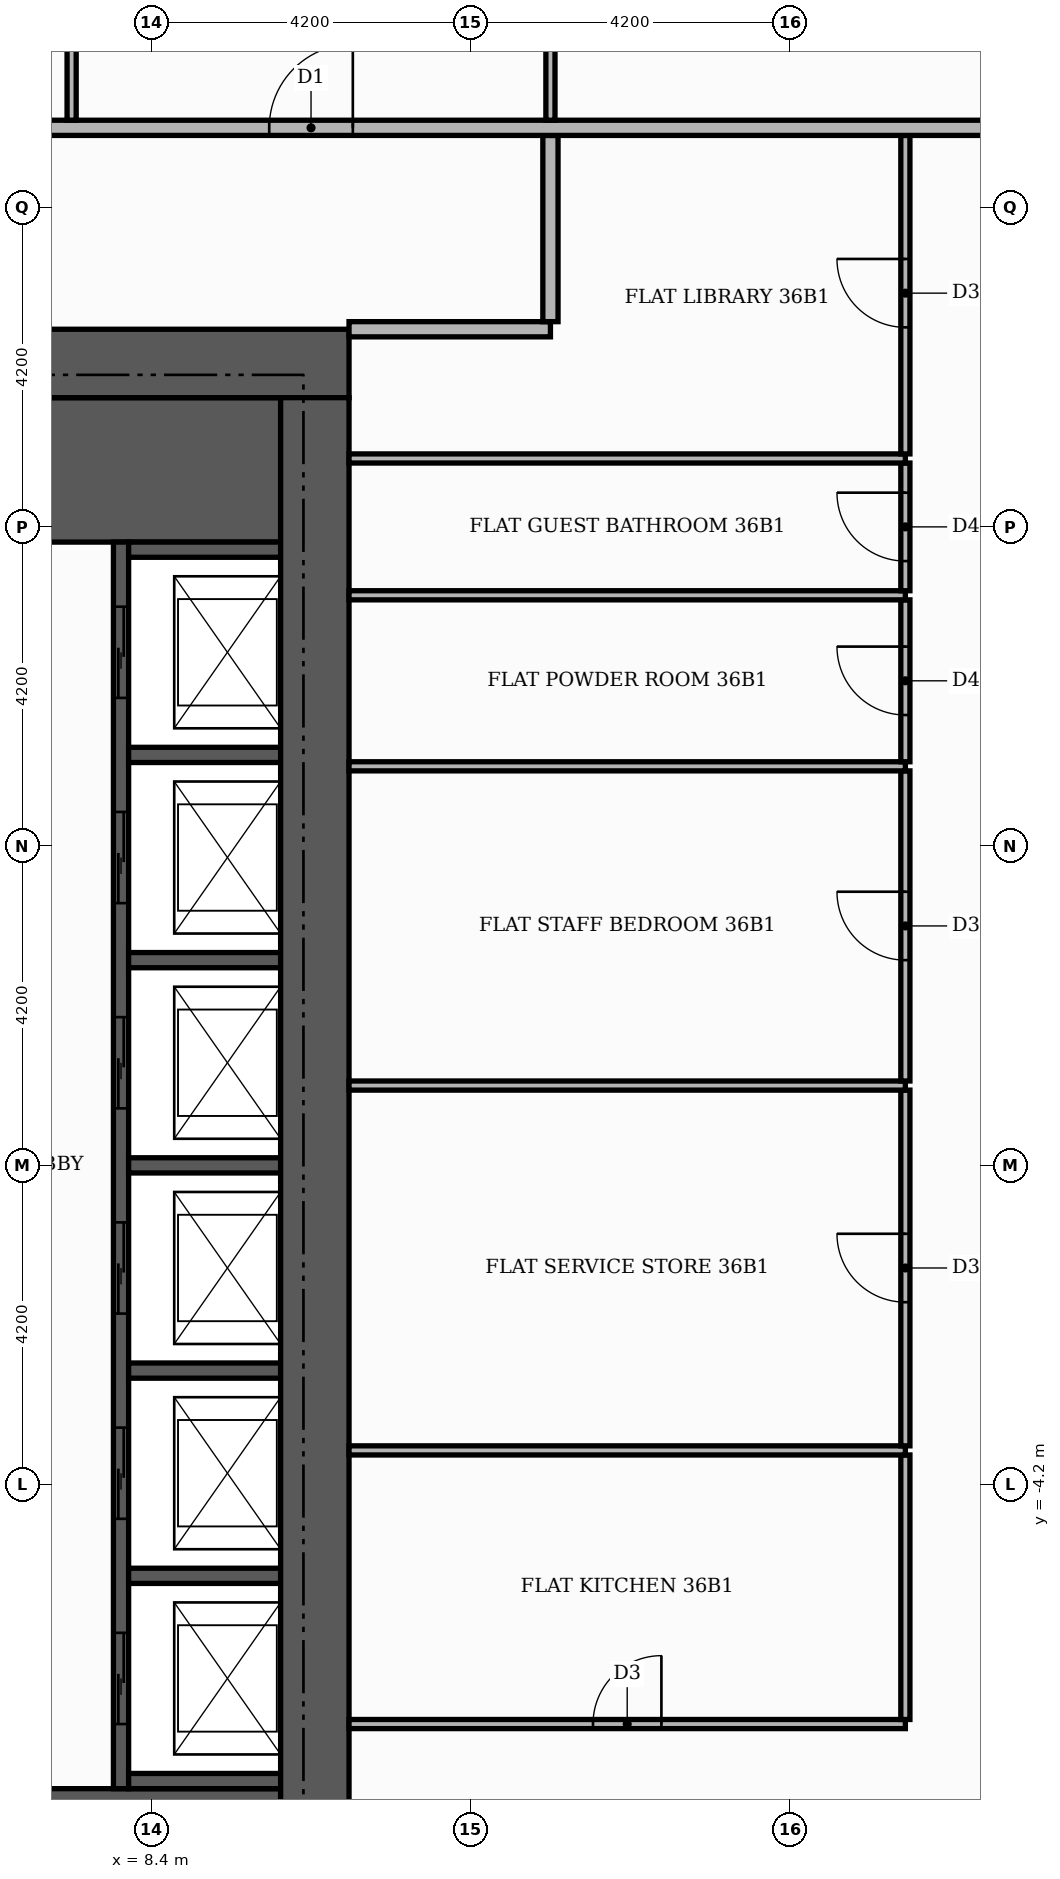
"""IFC4 building model, lengths in metres.
Left out: names, types, materials, properties, quantities, classifications, styles, units other than length and angle.
Written with IfcOpenShell. Run it as: python <this file> out.ifc"""

import sys

from ifc_helpers import new_model, si_unit, direction, frame, frame_2d, origin, place, context, subcontext, project, spatial, rectangle, extrude, element, fill, save


model = new_model("IFC4")
c1 = context("Model", 3, precision=1e-05, world=origin(), true_north=direction((0.0, 1.0)))
c2 = subcontext(c1, "Body", "Model", "MODEL_VIEW")
j1 = project(units=[si_unit("LENGTHUNIT", "METRE"), si_unit("PLANEANGLEUNIT", "RADIAN")], contexts=[c1])
p1 = place(None, origin())
s1 = spatial("IfcSite", under=j1, at=p1, CompositionType="ELEMENT")
p2 = place(p1, origin())
s2 = spatial("IfcBuilding", under=s1, at=p2, CompositionType="ELEMENT")
p3 = place(p2, frame((0.0, 0.0, 153.3)))
s3 = spatial("IfcBuildingStorey", under=s2, at=p3, CompositionType="ELEMENT", Elevation=153.3)
for number, where, z_axis, x_axis in (
    (1, (5.5, -9.15, 0.0), (0.0, 0.0, 1.0), (1.0, 0.0, 0.0)),
    (2, (5.5, 9.15, 0.0), (0.0, 0.0, 1.0), (1.0, 0.0, 0.0)),
):
    element("IfcWall", number, at=place(p3, frame(where, z_axis=z_axis, x_axis=x_axis)), inside=s3, PredefinedType="SHEAR", context=c2, shape_type="SweptSolid", body=[
        extrude(rectangle(XDim=4.6, YDim=1.9, at=frame_2d((2.3, 0.0))), origin(), (0.0, 0.0, 1.0), 3.48),
    ])
p4 = place(p3, frame((8.0, -8.2, 0.0), z_axis=(0.0, 0.0, 1.0), x_axis=(0.0, 1.0, 0.0)))
e3 = element("IfcWall", 3, at=p4, inside=s3, PredefinedType="SHEAR", context=c2, shape_type="SweptSolid", body=[
    extrude(rectangle(XDim=16.4, YDim=0.2, at=frame_2d((8.2, 0.0))), origin(), (0.0, 0.0, 1.0), 3.48),
])
p5 = place(p4, frame((0.85, 0.0, 0.0)))
e4 = element("IfcOpeningElement", 4, at=p5, cuts=e3, PredefinedType="OPENING", context=c2, shape_type="SweptSolid", body=[
    extrude(rectangle(XDim=1.2, YDim=2.1, at=frame_2d((0.6, 1.05))), frame((0.0, 0.11, 0.0), z_axis=(0.0, -1.0, 0.0), x_axis=(1.0, 0.0, 0.0)), (0.0, 0.0, 1.0), 0.22),
])
p6 = place(p4, frame((3.55, 0.0, 0.0)))
e5 = element("IfcOpeningElement", 5, at=p6, cuts=e3, PredefinedType="OPENING", context=c2, shape_type="SweptSolid", body=[
    extrude(rectangle(XDim=1.2, YDim=2.1, at=frame_2d((0.6, 1.05))), frame((0.0, 0.11, 0.0), z_axis=(0.0, -1.0, 0.0), x_axis=(1.0, 0.0, 0.0)), (0.0, 0.0, 1.0), 0.22),
])
p7 = place(p4, frame((6.25, 0.0, 0.0)))
e6 = element("IfcOpeningElement", 6, at=p7, cuts=e3, PredefinedType="OPENING", context=c2, shape_type="SweptSolid", body=[
    extrude(rectangle(XDim=1.2, YDim=2.1, at=frame_2d((0.6, 1.05))), frame((0.0, 0.11, 0.0), z_axis=(0.0, -1.0, 0.0), x_axis=(1.0, 0.0, 0.0)), (0.0, 0.0, 1.0), 0.22),
])
p8 = place(p4, frame((8.95, 0.0, 0.0)))
e7 = element("IfcOpeningElement", 7, at=p8, cuts=e3, PredefinedType="OPENING", context=c2, shape_type="SweptSolid", body=[
    extrude(rectangle(XDim=1.2, YDim=2.1, at=frame_2d((0.6, 1.05))), frame((0.0, 0.11, 0.0), z_axis=(0.0, -1.0, 0.0), x_axis=(1.0, 0.0, 0.0)), (0.0, 0.0, 1.0), 0.22),
])
p9 = place(p4, frame((11.65, 0.0, 0.0)))
e8 = element("IfcOpeningElement", 8, at=p9, cuts=e3, PredefinedType="OPENING", context=c2, shape_type="SweptSolid", body=[
    extrude(rectangle(XDim=1.2, YDim=2.1, at=frame_2d((0.6, 1.05))), frame((0.0, 0.11, 0.0), z_axis=(0.0, -1.0, 0.0), x_axis=(1.0, 0.0, 0.0)), (0.0, 0.0, 1.0), 0.22),
])
p10 = place(p4, frame((14.35, 0.0, 0.0)))
e9 = element("IfcOpeningElement", 9, at=p10, cuts=e3, PredefinedType="OPENING", context=c2, shape_type="SweptSolid", body=[
    extrude(rectangle(XDim=1.2, YDim=2.1, at=frame_2d((0.6, 1.05))), frame((0.0, 0.11, 0.0), z_axis=(0.0, -1.0, 0.0), x_axis=(1.0, 0.0, 0.0)), (0.0, 0.0, 1.0), 0.22),
])
for number, where, z_axis, x_axis in (
    (10, (8.1, -8.1, 0.0), (0.0, 0.0, 1.0), (1.0, 0.0, 0.0)),
    (11, (8.1, -5.4, 0.0), (0.0, 0.0, 1.0), (1.0, 0.0, 0.0)),
    (12, (8.1, -2.7, 0.0), (0.0, 0.0, 1.0), (1.0, 0.0, 0.0)),
    (13, (8.1, 0.0, 0.0), (0.0, 0.0, 1.0), (1.0, 0.0, 0.0)),
    (14, (8.1, 2.7, 0.0), (0.0, 0.0, 1.0), (1.0, 0.0, 0.0)),
    (15, (8.1, 5.4, 0.0), (0.0, 0.0, 1.0), (1.0, 0.0, 0.0)),
    (16, (8.1, 8.1, 0.0), (0.0, 0.0, 1.0), (1.0, 0.0, 0.0)),
):
    element("IfcWall", number, at=place(p3, frame(where, z_axis=z_axis, x_axis=x_axis)), inside=s3, PredefinedType="SHEAR", context=c2, shape_type="SweptSolid", body=[
        extrude(rectangle(XDim=2.0, YDim=0.2, at=frame_2d((1.0, 0.0))), origin(), (0.0, 0.0, 1.0), 3.48),
    ])
p11 = place(p3, frame((-11.0, 10.55, 0.0), z_axis=(0.0, 0.0, 1.0), x_axis=(1.0, 0.0, 0.0)))
e17 = element("IfcWall", 17, at=p11, inside=s3, PredefinedType="SHEAR", context=c2, shape_type="SweptSolid", body=[
    extrude(rectangle(XDim=22.0, YDim=0.9, at=frame_2d((11.0, 0.0))), origin(), (0.0, 0.0, 1.0), 3.48),
])
p12 = place(p11, frame((13.3, 0.0, 0.0)))
e18 = element("IfcOpeningElement", 18, at=p12, cuts=e17, PredefinedType="OPENING", context=c2, shape_type="SweptSolid", body=[
    extrude(rectangle(XDim=1.8, YDim=2.2, at=frame_2d((0.9, 1.1))), frame((0.0, 0.46, 0.0), z_axis=(0.0, -1.0, 0.0), x_axis=(1.0, 0.0, 0.0)), (0.0, 0.0, 1.0), 0.92),
])
p13 = place(p3, frame((10.55, -10.1, 0.0), z_axis=(0.0, 0.0, 1.0), x_axis=(0.0, 1.0, 0.0)))
e19 = element("IfcWall", 19, at=p13, inside=s3, PredefinedType="SHEAR", context=c2, shape_type="SweptSolid", body=[
    extrude(rectangle(XDim=20.2, YDim=0.9, at=frame_2d((10.1, 0.0))), origin(), (0.0, 0.0, 1.0), 3.48),
])
p14 = place(p3, frame((11.0, -7.35, 0.0), z_axis=(0.0, 0.0, 1.0), x_axis=(1.0, 0.0, 0.0)))
e20 = element("IfcWall", 20, at=p14, inside=s3, PredefinedType="PARTITIONING", context=c2, shape_type="SweptSolid", body=[
    extrude(rectangle(XDim=7.32, YDim=0.12, at=frame_2d((3.66, 0.0))), origin(), (0.0, 0.0, 1.0), 3.48),
])
p15 = place(p14, frame((3.21, 0.0, 0.0)))
e21 = element("IfcOpeningElement", 21, at=p15, cuts=e20, PredefinedType="OPENING", context=c2, shape_type="SweptSolid", body=[
    extrude(rectangle(XDim=0.9, YDim=2.1, at=frame_2d((0.45, 1.05))), frame((0.0, 0.07, 0.0), z_axis=(0.0, -1.0, 0.0), x_axis=(1.0, 0.0, 0.0)), (0.0, 0.0, 1.0), 0.14),
])
p16 = place(p3, frame((18.32, -7.29, 0.0), z_axis=(0.0, 0.0, 1.0), x_axis=(0.0, 1.0, 0.0)))
e22 = element("IfcWall", 22, at=p16, inside=s3, PredefinedType="PARTITIONING", context=c2, shape_type="SweptSolid", body=[
    extrude(rectangle(XDim=3.48, YDim=0.12, at=frame_2d((1.74, 0.0))), origin(), (0.0, 0.0, 1.0), 3.48),
])
p17 = place(p3, frame((11.0, -3.75, 0.0), z_axis=(0.0, 0.0, 1.0), x_axis=(1.0, 0.0, 0.0)))
e23 = element("IfcWall", 23, at=p17, inside=s3, PredefinedType="PARTITIONING", context=c2, shape_type="SweptSolid", body=[
    extrude(rectangle(XDim=7.32, YDim=0.12, at=frame_2d((3.66, 0.0))), origin(), (0.0, 0.0, 1.0), 3.48),
])
p18 = place(p3, frame((18.32, -3.69, 0.0), z_axis=(0.0, 0.0, 1.0), x_axis=(0.0, 1.0, 0.0)))
e24 = element("IfcWall", 24, at=p18, inside=s3, PredefinedType="PARTITIONING", context=c2, shape_type="SweptSolid", body=[
    extrude(rectangle(XDim=4.68, YDim=0.12, at=frame_2d((2.34, 0.0))), origin(), (0.0, 0.0, 1.0), 3.48),
])
p19 = place(p18, frame((1.89, 0.0, 0.0)))
e25 = element("IfcOpeningElement", 25, at=p19, cuts=e24, PredefinedType="OPENING", context=c2, shape_type="SweptSolid", body=[
    extrude(rectangle(XDim=0.9, YDim=2.1, at=frame_2d((0.45, 1.05))), frame((0.0, 0.07, 0.0), z_axis=(0.0, -1.0, 0.0), x_axis=(1.0, 0.0, 0.0)), (0.0, 0.0, 1.0), 0.14),
])
p20 = place(p3, frame((11.0, 1.05, 0.0), z_axis=(0.0, 0.0, 1.0), x_axis=(1.0, 0.0, 0.0)))
e26 = element("IfcWall", 26, at=p20, inside=s3, PredefinedType="PARTITIONING", context=c2, shape_type="SweptSolid", body=[
    extrude(rectangle(XDim=7.32, YDim=0.12, at=frame_2d((3.66, 0.0))), origin(), (0.0, 0.0, 1.0), 3.48),
])
p21 = place(p3, frame((18.32, 1.11, 0.0), z_axis=(0.0, 0.0, 1.0), x_axis=(0.0, 1.0, 0.0)))
e27 = element("IfcWall", 27, at=p21, inside=s3, PredefinedType="PARTITIONING", context=c2, shape_type="SweptSolid", body=[
    extrude(rectangle(XDim=4.08, YDim=0.12, at=frame_2d((2.04, 0.0))), origin(), (0.0, 0.0, 1.0), 3.48),
])
p22 = place(p21, frame((1.59, 0.0, 0.0)))
e28 = element("IfcOpeningElement", 28, at=p22, cuts=e27, PredefinedType="OPENING", context=c2, shape_type="SweptSolid", body=[
    extrude(rectangle(XDim=0.9, YDim=2.1, at=frame_2d((0.45, 1.05))), frame((0.0, 0.07, 0.0), z_axis=(0.0, -1.0, 0.0), x_axis=(1.0, 0.0, 0.0)), (0.0, 0.0, 1.0), 0.14),
])
p23 = place(p3, frame((11.0, 5.25, 0.0), z_axis=(0.0, 0.0, 1.0), x_axis=(1.0, 0.0, 0.0)))
e29 = element("IfcWall", 29, at=p23, inside=s3, PredefinedType="PARTITIONING", context=c2, shape_type="SweptSolid", body=[
    extrude(rectangle(XDim=7.32, YDim=0.12, at=frame_2d((3.66, 0.0))), origin(), (0.0, 0.0, 1.0), 3.48),
])
p24 = place(p3, frame((18.32, 5.31, 0.0), z_axis=(0.0, 0.0, 1.0), x_axis=(0.0, 1.0, 0.0)))
e30 = element("IfcWall", 30, at=p24, inside=s3, PredefinedType="PARTITIONING", context=c2, shape_type="SweptSolid", body=[
    extrude(rectangle(XDim=2.13, YDim=0.12, at=frame_2d((1.065, 0.0))), origin(), (0.0, 0.0, 1.0), 3.48),
])
p25 = place(p24, frame((0.615, 0.0, 0.0)))
e31 = element("IfcOpeningElement", 31, at=p25, cuts=e30, PredefinedType="OPENING", context=c2, shape_type="SweptSolid", body=[
    extrude(rectangle(XDim=0.9, YDim=2.1, at=frame_2d((0.45, 1.05))), frame((0.0, 0.07, 0.0), z_axis=(0.0, -1.0, 0.0), x_axis=(1.0, 0.0, 0.0)), (0.0, 0.0, 1.0), 0.14),
])
p26 = place(p3, frame((11.0, 7.5, 0.0), z_axis=(0.0, 0.0, 1.0), x_axis=(1.0, 0.0, 0.0)))
e32 = element("IfcWall", 32, at=p26, inside=s3, PredefinedType="PARTITIONING", context=c2, shape_type="SweptSolid", body=[
    extrude(rectangle(XDim=7.32, YDim=0.12, at=frame_2d((3.66, 0.0))), origin(), (0.0, 0.0, 1.0), 3.48),
])
p27 = place(p3, frame((18.32, 7.56, 0.0), z_axis=(0.0, 0.0, 1.0), x_axis=(0.0, 1.0, 0.0)))
e33 = element("IfcWall", 33, at=p27, inside=s3, PredefinedType="PARTITIONING", context=c2, shape_type="SweptSolid", body=[
    extrude(rectangle(XDim=1.68, YDim=0.12, at=frame_2d((0.84, 0.0))), origin(), (0.0, 0.0, 1.0), 3.48),
])
p28 = place(p27, frame((0.39, 0.0, 0.0)))
e34 = element("IfcOpeningElement", 34, at=p28, cuts=e33, PredefinedType="OPENING", context=c2, shape_type="SweptSolid", body=[
    extrude(rectangle(XDim=0.9, YDim=2.1, at=frame_2d((0.45, 1.05))), frame((0.0, 0.07, 0.0), z_axis=(0.0, -1.0, 0.0), x_axis=(1.0, 0.0, 0.0)), (0.0, 0.0, 1.0), 0.14),
])
p29 = place(p3, frame((11.0, 9.3, 0.0), z_axis=(0.0, 0.0, 1.0), x_axis=(1.0, 0.0, 0.0)))
e35 = element("IfcWall", 35, at=p29, inside=s3, PredefinedType="PARTITIONING", context=c2, shape_type="SweptSolid", body=[
    extrude(rectangle(XDim=7.32, YDim=0.12, at=frame_2d((3.66, 0.0))), origin(), (0.0, 0.0, 1.0), 3.48),
])
p30 = place(p3, frame((18.32, 9.36, 0.0), z_axis=(0.0, 0.0, 1.0), x_axis=(0.0, 1.0, 0.0)))
e36 = element("IfcWall", 36, at=p30, inside=s3, PredefinedType="PARTITIONING", context=c2, shape_type="SweptSolid", body=[
    extrude(rectangle(XDim=4.19, YDim=0.12, at=frame_2d((2.095, 0.0))), origin(), (0.0, 0.0, 1.0), 3.48),
])
p31 = place(p30, frame((1.665, 0.0, 0.0)))
e37 = element("IfcOpeningElement", 37, at=p31, cuts=e36, PredefinedType="OPENING", context=c2, shape_type="SweptSolid", body=[
    extrude(rectangle(XDim=0.9, YDim=2.1, at=frame_2d((0.45, 1.05))), frame((0.0, 0.07, 0.0), z_axis=(0.0, -1.0, 0.0), x_axis=(1.0, 0.0, 0.0)), (0.0, 0.0, 1.0), 0.14),
])
p32 = place(p3, frame((11.0, 11.0, 0.0), z_axis=(0.0, 0.0, 1.0), x_axis=(1.0, 0.0, 0.0)))
e38 = element("IfcWall", 38, at=p32, inside=s3, PredefinedType="PARTITIONING", context=c2, shape_type="SweptSolid", body=[
    extrude(rectangle(XDim=2.65, YDim=0.2, at=frame_2d((1.325, 0.0))), origin(), (0.0, 0.0, 1.0), 3.48),
])
p33 = place(p3, frame((13.65, 11.1, 0.0), z_axis=(0.0, 0.0, 1.0), x_axis=(0.0, 1.0, 0.0)))
e39 = element("IfcWall", 39, at=p33, inside=s3, PredefinedType="PARTITIONING", context=c2, shape_type="SweptSolid", body=[
    extrude(rectangle(XDim=2.45, YDim=0.2, at=frame_2d((1.225, 0.0))), origin(), (0.0, 0.0, 1.0), 3.48),
])
p34 = place(p3, frame((-13.65, 13.65, 0.0), z_axis=(0.0, 0.0, 1.0), x_axis=(1.0, 0.0, 0.0)))
e40 = element("IfcWall", 40, at=p34, inside=s3, PredefinedType="PARTITIONING", context=c2, shape_type="SweptSolid", body=[
    extrude(rectangle(XDim=39.07, YDim=0.2, at=frame_2d((19.535, 0.0))), origin(), (0.0, 0.0, 1.0), 3.48),
])
p35 = place(p34, frame((23.6, 0.0, 0.0)))
e41 = element("IfcOpeningElement", 41, at=p35, cuts=e40, PredefinedType="OPENING", context=c2, shape_type="SweptSolid", body=[
    extrude(rectangle(XDim=1.1, YDim=2.4, at=frame_2d((0.55, 1.2))), frame((0.0, 0.11, 0.0), z_axis=(0.0, -1.0, 0.0), x_axis=(1.0, 0.0, 0.0)), (0.0, 0.0, 1.0), 0.22),
])
p36 = place(p3, frame((7.35, 13.75, 0.0), z_axis=(0.0, 0.0, 1.0), x_axis=(0.0, 1.0, 0.0)))
e42 = element("IfcWall", 42, at=p36, inside=s3, PredefinedType="PARTITIONING", context=c2, shape_type="SweptSolid", body=[
    extrude(rectangle(XDim=5.11, YDim=0.12, at=frame_2d((2.555, 0.0))), origin(), (0.0, 0.0, 1.0), 3.48),
])
p37 = place(p3, frame((13.65, 13.75, 0.0), z_axis=(0.0, 0.0, 1.0), x_axis=(0.0, 1.0, 0.0)))
e43 = element("IfcWall", 43, at=p37, inside=s3, PredefinedType="PARTITIONING", context=c2, shape_type="SweptSolid", body=[
    extrude(rectangle(XDim=6.61, YDim=0.12, at=frame_2d((3.305, 0.0))), origin(), (0.0, 0.0, 1.0), 3.48),
])
p38 = place(p37, frame((2.835, 0.0, 0.0)))
e44 = element("IfcOpeningElement", 44, at=p38, cuts=e43, PredefinedType="OPENING", context=c2, shape_type="SweptSolid", body=[
    extrude(rectangle(XDim=0.9, YDim=2.1, at=frame_2d((0.45, 1.05))), frame((0.0, 0.07, 0.0), z_axis=(0.0, -1.0, 0.0), x_axis=(1.0, 0.0, 0.0)), (0.0, 0.0, 1.0), 0.14),
])
p39 = place(p5, origin())
e45 = element("IfcDoor", 45, at=p39, inside=s3, OperationType="SLIDING_TO_LEFT", PredefinedType="DOOR", context=c2, shape_type="SweptSolid", body=[
    extrude(rectangle(XDim=1.2, YDim=2.1, at=frame_2d((0.6, 1.05))), frame((0.0, 0.025, 0.0), z_axis=(0.0, -1.0, 0.0), x_axis=(1.0, 0.0, 0.0)), (0.0, 0.0, 1.0), 0.05),
])
fill(e4, e45)
p40 = place(p6, origin())
e46 = element("IfcDoor", 46, at=p40, inside=s3, OperationType="SLIDING_TO_LEFT", PredefinedType="DOOR", context=c2, shape_type="SweptSolid", body=[
    extrude(rectangle(XDim=1.2, YDim=2.1, at=frame_2d((0.6, 1.05))), frame((0.0, 0.025, 0.0), z_axis=(0.0, -1.0, 0.0), x_axis=(1.0, 0.0, 0.0)), (0.0, 0.0, 1.0), 0.05),
])
fill(e5, e46)
p41 = place(p7, origin())
e47 = element("IfcDoor", 47, at=p41, inside=s3, OperationType="SLIDING_TO_LEFT", PredefinedType="DOOR", context=c2, shape_type="SweptSolid", body=[
    extrude(rectangle(XDim=1.2, YDim=2.1, at=frame_2d((0.6, 1.05))), frame((0.0, 0.025, 0.0), z_axis=(0.0, -1.0, 0.0), x_axis=(1.0, 0.0, 0.0)), (0.0, 0.0, 1.0), 0.05),
])
fill(e6, e47)
p42 = place(p8, origin())
e48 = element("IfcDoor", 48, at=p42, inside=s3, OperationType="SLIDING_TO_LEFT", PredefinedType="DOOR", context=c2, shape_type="SweptSolid", body=[
    extrude(rectangle(XDim=1.2, YDim=2.1, at=frame_2d((0.6, 1.05))), frame((0.0, 0.025, 0.0), z_axis=(0.0, -1.0, 0.0), x_axis=(1.0, 0.0, 0.0)), (0.0, 0.0, 1.0), 0.05),
])
fill(e7, e48)
p43 = place(p9, origin())
e49 = element("IfcDoor", 49, at=p43, inside=s3, OperationType="SLIDING_TO_LEFT", PredefinedType="DOOR", context=c2, shape_type="SweptSolid", body=[
    extrude(rectangle(XDim=1.2, YDim=2.1, at=frame_2d((0.6, 1.05))), frame((0.0, 0.025, 0.0), z_axis=(0.0, -1.0, 0.0), x_axis=(1.0, 0.0, 0.0)), (0.0, 0.0, 1.0), 0.05),
])
fill(e8, e49)
p44 = place(p10, origin())
e50 = element("IfcDoor", 50, at=p44, inside=s3, OperationType="SLIDING_TO_LEFT", PredefinedType="DOOR", context=c2, shape_type="SweptSolid", body=[
    extrude(rectangle(XDim=1.2, YDim=2.1, at=frame_2d((0.6, 1.05))), frame((0.0, 0.025, 0.0), z_axis=(0.0, -1.0, 0.0), x_axis=(1.0, 0.0, 0.0)), (0.0, 0.0, 1.0), 0.05),
])
fill(e9, e50)
p45 = place(p15, origin())
e51 = element("IfcDoor", 51, at=p45, inside=s3, OperationType="SINGLE_SWING_RIGHT", PredefinedType="DOOR", context=c2, shape_type="SweptSolid", body=[
    extrude(rectangle(XDim=0.9, YDim=2.1, at=frame_2d((0.45, 1.05))), frame((0.0, 0.025, 0.0), z_axis=(0.0, -1.0, 0.0), x_axis=(1.0, 0.0, 0.0)), (0.0, 0.0, 1.0), 0.05),
])
fill(e21, e51)
p46 = place(p19, origin())
e52 = element("IfcDoor", 52, at=p46, inside=s3, OperationType="SINGLE_SWING_RIGHT", PredefinedType="DOOR", context=c2, shape_type="SweptSolid", body=[
    extrude(rectangle(XDim=0.9, YDim=2.1, at=frame_2d((0.45, 1.05))), frame((0.0, 0.025, 0.0), z_axis=(0.0, -1.0, 0.0), x_axis=(1.0, 0.0, 0.0)), (0.0, 0.0, 1.0), 0.05),
])
fill(e25, e52)
p47 = place(p22, origin())
e53 = element("IfcDoor", 53, at=p47, inside=s3, OperationType="SINGLE_SWING_RIGHT", PredefinedType="DOOR", context=c2, shape_type="SweptSolid", body=[
    extrude(rectangle(XDim=0.9, YDim=2.1, at=frame_2d((0.45, 1.05))), frame((0.0, 0.025, 0.0), z_axis=(0.0, -1.0, 0.0), x_axis=(1.0, 0.0, 0.0)), (0.0, 0.0, 1.0), 0.05),
])
fill(e28, e53)
p48 = place(p25, origin())
e54 = element("IfcDoor", 54, at=p48, inside=s3, OperationType="SINGLE_SWING_RIGHT", PredefinedType="DOOR", context=c2, shape_type="SweptSolid", body=[
    extrude(rectangle(XDim=0.9, YDim=2.1, at=frame_2d((0.45, 1.05))), frame((0.0, 0.025, 0.0), z_axis=(0.0, -1.0, 0.0), x_axis=(1.0, 0.0, 0.0)), (0.0, 0.0, 1.0), 0.05),
])
fill(e31, e54)
p49 = place(p28, origin())
e55 = element("IfcDoor", 55, at=p49, inside=s3, OperationType="SINGLE_SWING_RIGHT", PredefinedType="DOOR", context=c2, shape_type="SweptSolid", body=[
    extrude(rectangle(XDim=0.9, YDim=2.1, at=frame_2d((0.45, 1.05))), frame((0.0, 0.025, 0.0), z_axis=(0.0, -1.0, 0.0), x_axis=(1.0, 0.0, 0.0)), (0.0, 0.0, 1.0), 0.05),
])
fill(e34, e55)
p50 = place(p31, origin())
e56 = element("IfcDoor", 56, at=p50, inside=s3, OperationType="SINGLE_SWING_RIGHT", PredefinedType="DOOR", context=c2, shape_type="SweptSolid", body=[
    extrude(rectangle(XDim=0.9, YDim=2.1, at=frame_2d((0.45, 1.05))), frame((0.0, 0.025, 0.0), z_axis=(0.0, -1.0, 0.0), x_axis=(1.0, 0.0, 0.0)), (0.0, 0.0, 1.0), 0.05),
])
fill(e37, e56)
p51 = place(p35, origin())
e57 = element("IfcDoor", 57, at=p51, inside=s3, OperationType="SINGLE_SWING_RIGHT", PredefinedType="DOOR", context=c2, shape_type="SweptSolid", body=[
    extrude(rectangle(XDim=1.1, YDim=2.4, at=frame_2d((0.55, 1.2))), frame((0.0, 0.025, 0.0), z_axis=(0.0, -1.0, 0.0), x_axis=(1.0, 0.0, 0.0)), (0.0, 0.0, 1.0), 0.05),
])
fill(e41, e57)
save(model, sys.argv[1])
